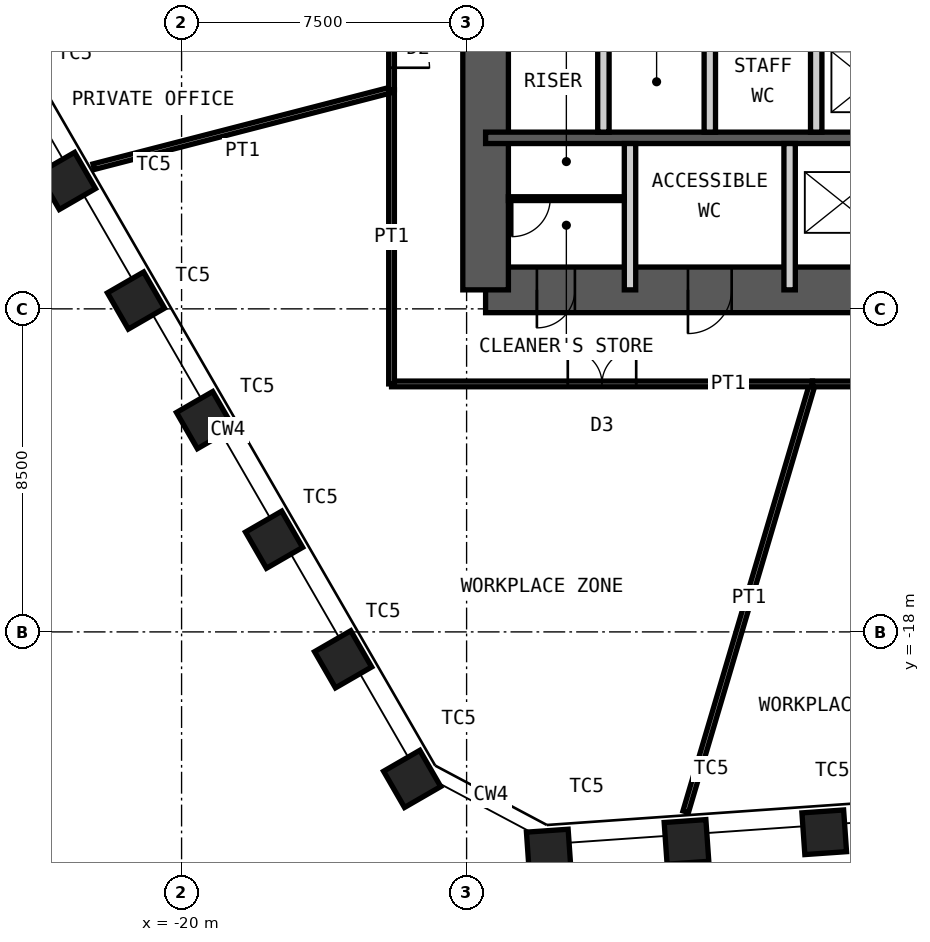
"""IFC4 building model, lengths in metres.
Left out: names, types, materials, properties, quantities, classifications, styles, units other than length and angle.
Written with IfcOpenShell. Run it as: python <this file> out.ifc"""

import sys

from ifc_helpers import new_model, si_unit, direction, frame, frame_2d, origin, origin_2d, place, context, subcontext, project, spatial, rectangle, hollow_rectangle, extrude, element, fill, save


model = new_model("IFC4")
c1 = context("Model", 3, precision=1e-05, world=origin(), true_north=direction((0.0, 1.0)))
c2 = subcontext(c1, "Body", "Model", "MODEL_VIEW")
j1 = project(units=[si_unit("LENGTHUNIT", "METRE"), si_unit("PLANEANGLEUNIT", "RADIAN")], contexts=[c1])
p1 = place(None, origin())
s1 = spatial("IfcSite", under=j1, at=p1, CompositionType="ELEMENT")
p2 = place(p1, origin())
s2 = spatial("IfcBuilding", under=s1, at=p2, CompositionType="ELEMENT")
p3 = place(p2, frame((0.0, 0.0, 214.0)))
s3 = spatial("IfcBuildingStorey", under=s2, at=p3, CompositionType="ELEMENT", Elevation=214.0)
for number, where, z_axis, x_axis in (
    (1, (-3.089, -23.272, 0.0), (0.0, 0.0, 1.0), (0.998, 0.07, 0.0)),
    (2, (-6.714, -23.526, 0.0), (0.0, 0.0, 1.0), (0.998, 0.07, 0.0)),
    (3, (-10.338, -23.779, 0.0), (0.0, 0.0, 1.0), (0.998, 0.07, 0.0)),
    (4, (-13.933, -21.868, 0.0), (0.0, 0.0, 1.0), (0.5, -0.866, 0.0)),
    (5, (-15.749, -18.721, 0.0), (0.0, 0.0, 1.0), (0.5, -0.866, 0.0)),
    (6, (-17.566, -15.574, 0.0), (0.0, 0.0, 1.0), (0.5, -0.866, 0.0)),
    (7, (-19.383, -12.428, 0.0), (0.0, 0.0, 1.0), (0.5, -0.866, 0.0)),
    (8, (-21.2, -9.281, 0.0), (0.0, 0.0, 1.0), (0.5, -0.866, 0.0)),
    (9, (-23.016, -6.134, 0.0), (0.0, 0.0, 1.0), (0.5, -0.866, 0.0)),
):
    element("IfcColumn", number, at=place(p3, frame(where, z_axis=z_axis, x_axis=x_axis)), inside=s3, PredefinedType="COLUMN", context=c2, shape_type="SweptSolid", body=[
        extrude(hollow_rectangle(XDim=1.1, YDim=1.1, WallThickness=0.07, at=origin_2d()), origin(), (0.0, 0.0, 1.0), 4.2),
    ])
p4 = place(p3, frame((-12.0, -9.0, 0.0), z_axis=(0.0, 0.0, 1.0), x_axis=(1.0, 0.0, 0.0)))
e10 = element("IfcWall", 10, at=p4, inside=s3, PredefinedType="SHEAR", context=c2, shape_type="SweptSolid", body=[
    extrude(rectangle(XDim=24.0, YDim=1.2, at=frame_2d((12.0, 0.0))), origin(), (0.0, 0.0, 1.0), 4.2),
])
p5 = place(p4, frame((1.35, 0.0, 0.0)))
e11 = element("IfcOpeningElement", 11, at=p5, cuts=e10, PredefinedType="OPENING", context=c2, shape_type="SweptSolid", body=[
    extrude(rectangle(XDim=1.0, YDim=2.1, at=frame_2d((0.5, 1.05))), frame((0.0, 0.61, 0.0), z_axis=(0.0, -1.0, 0.0), x_axis=(1.0, 0.0, 0.0)), (0.0, 0.0, 1.0), 1.22),
])
p6 = place(p4, frame((5.325, 0.0, 0.0)))
e12 = element("IfcOpeningElement", 12, at=p6, cuts=e10, PredefinedType="OPENING", context=c2, shape_type="SweptSolid", body=[
    extrude(rectangle(XDim=1.15, YDim=2.1, at=frame_2d((0.575, 1.05))), frame((0.0, 0.61, 0.0), z_axis=(0.0, -1.0, 0.0), x_axis=(1.0, 0.0, 0.0)), (0.0, 0.0, 1.0), 1.22),
])
p7 = place(p4, frame((12.6, 0.0, 0.0)))
e13 = element("IfcOpeningElement", 13, at=p7, cuts=e10, PredefinedType="OPENING", context=c2, shape_type="SweptSolid", body=[
    extrude(rectangle(XDim=1.0, YDim=2.1, at=frame_2d((0.5, 1.05))), frame((0.0, 0.61, 0.0), z_axis=(0.0, -1.0, 0.0), x_axis=(1.0, 0.0, 0.0)), (0.0, 0.0, 1.0), 1.22),
])
p8 = place(p3, frame((-12.0, -9.0, 0.0), z_axis=(0.0, 0.0, 1.0), x_axis=(0.0, 1.0, 0.0)))
e14 = element("IfcWall", 14, at=p8, inside=s3, PredefinedType="SHEAR", context=c2, shape_type="SweptSolid", body=[
    extrude(rectangle(XDim=18.0, YDim=1.2, at=frame_2d((9.0, 0.0))), origin(), (0.0, 0.0, 1.0), 4.2),
])
p9 = place(p8, frame((8.1, 0.0, 0.0)))
e15 = element("IfcOpeningElement", 15, at=p9, cuts=e14, PredefinedType="OPENING", context=c2, shape_type="SweptSolid", body=[
    extrude(rectangle(XDim=1.8, YDim=2.1, at=frame_2d((0.9, 1.05))), frame((0.0, 0.61, 0.0), z_axis=(0.0, -1.0, 0.0), x_axis=(1.0, 0.0, 0.0)), (0.0, 0.0, 1.0), 1.22),
])
p10 = place(p3, frame((-12.0, -5.0, 0.0), z_axis=(0.0, 0.0, 1.0), x_axis=(1.0, 0.0, 0.0)))
e16 = element("IfcWall", 16, at=p10, inside=s3, PredefinedType="SHEAR", context=c2, shape_type="SweptSolid", body=[
    extrude(rectangle(XDim=24.0, YDim=0.3, at=frame_2d((12.0, 0.0))), origin(), (0.0, 0.0, 1.0), 4.2),
])
for number, where, z_axis, x_axis in (
    (17, (-8.9, -4.85, 0.0), (0.0, 0.0, 1.0), (0.0, 1.0, 0.0)),
    (18, (-6.1, -4.85, 0.0), (0.0, 0.0, 1.0), (0.0, 1.0, 0.0)),
    (19, (-3.3, -4.85, 0.0), (0.0, 0.0, 1.0), (0.0, 1.0, 0.0)),
):
    element("IfcWall", number, at=place(p3, frame(where, z_axis=z_axis, x_axis=x_axis)), inside=s3, PredefinedType="PARTITIONING", context=c2, shape_type="SweptSolid", body=[
        extrude(rectangle(XDim=2.65, YDim=0.3, at=frame_2d((1.325, 0.0))), origin(), (0.0, 0.0, 1.0), 3.98),
    ])
for number, where, z_axis, x_axis in (
    (20, (-8.2, -9.0, 0.0), (0.0, 0.0, 1.0), (0.0, 1.0, 0.0)),
    (21, (-4.0, -9.0, 0.0), (0.0, 0.0, 1.0), (0.0, 1.0, 0.0)),
):
    element("IfcWall", number, at=place(p3, frame(where, z_axis=z_axis, x_axis=x_axis)), inside=s3, PredefinedType="PARTITIONING", context=c2, shape_type="SweptSolid", body=[
        extrude(rectangle(XDim=3.85, YDim=0.3, at=frame_2d((1.925, 0.0))), origin(), (0.0, 0.0, 1.0), 3.98),
    ])
p11 = place(p3, frame((-11.4, -6.6, 0.0), z_axis=(0.0, 0.0, 1.0), x_axis=(1.0, 0.0, 0.0)))
e22 = element("IfcWall", 22, at=p11, inside=s3, PredefinedType="PARTITIONING", context=c2, shape_type="SweptSolid", body=[
    extrude(rectangle(XDim=3.05, YDim=0.1, at=frame_2d((1.525, 0.0))), origin(), (0.0, 0.0, 1.0), 3.98),
])
p12 = place(p11, frame((0.1, 0.0, 0.0)))
e23 = element("IfcOpeningElement", 23, at=p12, cuts=e22, PredefinedType="OPENING", context=c2, shape_type="SweptSolid", body=[
    extrude(rectangle(XDim=1.0, YDim=2.4, at=frame_2d((0.5, 1.2))), frame((0.0, 0.06, 0.0), z_axis=(0.0, -1.0, 0.0), x_axis=(1.0, 0.0, 0.0)), (0.0, 0.0, 1.0), 0.12),
])
p13 = place(p3, frame((-6.734, -22.731, 0.0), z_axis=(0.0, 0.0, 1.0), x_axis=(0.284049386564, 0.958809650553, 0.0)))
e24 = element("IfcWall", 24, at=p13, inside=s3, PredefinedType="PARTITIONING", context=c2, shape_type="SweptSolid", body=[
    extrude(rectangle(XDim=11.74, YDim=0.15, at=frame_2d((5.87, 0.0))), origin(), (0.0, 0.0, 1.0), 3.33),
])
p14 = place(p3, frame((-3.399, -11.475, 0.0), z_axis=(0.0, 0.0, 1.0), x_axis=(-1.0, 0.0, 0.0)))
e25 = element("IfcWall", 25, at=p14, inside=s3, PredefinedType="PARTITIONING", context=c2, shape_type="SweptSolid", body=[
    extrude(rectangle(XDim=11.076, YDim=0.15, at=frame_2d((5.538, 0.0))), origin(), (0.0, 0.0, 1.0), 4.03),
])
p15 = place(p14, frame((4.638, 0.0, 0.0)))
e26 = element("IfcOpeningElement", 26, at=p15, cuts=e25, PredefinedType="OPENING", context=c2, shape_type="SweptSolid", body=[
    extrude(rectangle(XDim=1.8, YDim=2.4, at=frame_2d((0.9, 1.2))), frame((0.0, 0.085, 0.0), z_axis=(0.0, -1.0, 0.0), x_axis=(1.0, 0.0, 0.0)), (0.0, 0.0, 1.0), 0.17),
])
p16 = place(p3, frame((-14.475, -11.475, 0.0), z_axis=(0.0, 0.0, 1.0), x_axis=(0.0, 1.0, 0.0)))
e27 = element("IfcWall", 27, at=p16, inside=s3, PredefinedType="PARTITIONING", context=c2, shape_type="SweptSolid", body=[
    extrude(rectangle(XDim=7.739, YDim=0.15, at=frame_2d((3.87, 0.0))), origin(), (0.0, 0.0, 1.0), 4.03),
])
p17 = place(p3, frame((-22.313, -5.759, 0.0), z_axis=(0.0, 0.0, 1.0), x_axis=(0.968265788926, 0.249922712042, 0.0)))
e28 = element("IfcWall", 28, at=p17, inside=s3, PredefinedType="PARTITIONING", context=c2, shape_type="SweptSolid", body=[
    extrude(rectangle(XDim=8.095, YDim=0.15, at=frame_2d((4.048, 0.0))), origin(), (0.0, 0.0, 1.0), 3.43),
])
p18 = place(p3, frame((-14.475, -3.736, 0.0), z_axis=(0.0, 0.0, 1.0), x_axis=(0.0, 1.0, 0.0)))
e29 = element("IfcWall", 29, at=p18, inside=s3, PredefinedType="PARTITIONING", context=c2, shape_type="SweptSolid", body=[
    extrude(rectangle(XDim=2.16, YDim=0.15, at=frame_2d((1.08, 0.0))), origin(), (0.0, 0.0, 1.0), 4.03),
])
p19 = place(p18, frame((0.58, 0.0, 0.0)))
e30 = element("IfcOpeningElement", 30, at=p19, cuts=e29, PredefinedType="OPENING", context=c2, shape_type="SweptSolid", body=[
    extrude(rectangle(XDim=1.0, YDim=2.4, at=frame_2d((0.5, 1.2))), frame((0.0, 0.085, 0.0), z_axis=(0.0, -1.0, 0.0), x_axis=(1.0, 0.0, 0.0)), (0.0, 0.0, 1.0), 0.17),
])
p20 = place(p3, frame((0.25, -11.475, 0.0), z_axis=(0.0, 0.0, 1.0), x_axis=(-1.0, 0.0, 0.0)))
e31 = element("IfcWall", 31, at=p20, inside=s3, PredefinedType="PARTITIONING", context=c2, shape_type="SweptSolid", body=[
    extrude(rectangle(XDim=3.65, YDim=0.15, at=frame_2d((1.825, 0.0))), origin(), (0.0, 0.0, 1.0), 4.03),
])
p21 = place(p20, frame((1.325, 0.0, 0.0)))
e32 = element("IfcOpeningElement", 32, at=p21, cuts=e31, PredefinedType="OPENING", context=c2, shape_type="SweptSolid", body=[
    extrude(rectangle(XDim=1.0, YDim=2.4, at=frame_2d((0.5, 1.2))), frame((0.0, 0.085, 0.0), z_axis=(0.0, -1.0, 0.0), x_axis=(1.0, 0.0, 0.0)), (0.0, 0.0, 1.0), 0.17),
])
p22 = place(p5, origin())
e33 = element("IfcDoor", 33, at=p22, inside=s3, OperationType="SINGLE_SWING_LEFT", PredefinedType="DOOR", context=c2, shape_type="SweptSolid", body=[
    extrude(rectangle(XDim=1.0, YDim=2.1, at=frame_2d((0.5, 1.05))), frame((0.0, 0.025, 0.0), z_axis=(0.0, -1.0, 0.0), x_axis=(1.0, 0.0, 0.0)), (0.0, 0.0, 1.0), 0.05),
])
fill(e11, e33)
p23 = place(p6, origin())
e34 = element("IfcDoor", 34, at=p23, inside=s3, OperationType="SINGLE_SWING_LEFT", PredefinedType="DOOR", context=c2, shape_type="SweptSolid", body=[
    extrude(rectangle(XDim=1.15, YDim=2.1, at=frame_2d((0.575, 1.05))), frame((0.0, 0.025, 0.0), z_axis=(0.0, -1.0, 0.0), x_axis=(1.0, 0.0, 0.0)), (0.0, 0.0, 1.0), 0.05),
])
fill(e12, e34)
p24 = place(p12, origin())
e35 = element("IfcDoor", 35, at=p24, inside=s3, OperationType="SINGLE_SWING_LEFT", PredefinedType="DOOR", context=c2, shape_type="SweptSolid", body=[
    extrude(rectangle(XDim=1.0, YDim=2.4, at=frame_2d((0.5, 1.2))), frame((0.0, 0.025, 0.0), z_axis=(0.0, -1.0, 0.0), x_axis=(1.0, 0.0, 0.0)), (0.0, 0.0, 1.0), 0.05),
])
fill(e23, e35)
p25 = place(p15, origin())
e36 = element("IfcDoor", 36, at=p25, inside=s3, OperationType="DOUBLE_DOOR_DOUBLE_SWING", PredefinedType="DOOR", context=c2, shape_type="SweptSolid", body=[
    extrude(rectangle(XDim=1.8, YDim=2.4, at=frame_2d((0.9, 1.2))), frame((0.0, 0.025, 0.0), z_axis=(0.0, -1.0, 0.0), x_axis=(1.0, 0.0, 0.0)), (0.0, 0.0, 1.0), 0.05),
])
fill(e26, e36)
p26 = place(p19, origin())
e37 = element("IfcDoor", 37, at=p26, inside=s3, OperationType="SINGLE_SWING_LEFT", PredefinedType="DOOR", context=c2, shape_type="SweptSolid", body=[
    extrude(rectangle(XDim=1.0, YDim=2.4, at=frame_2d((0.5, 1.2))), frame((0.0, 0.025, 0.0), z_axis=(0.0, -1.0, 0.0), x_axis=(1.0, 0.0, 0.0)), (0.0, 0.0, 1.0), 0.05),
])
fill(e30, e37)
save(model, sys.argv[1])
